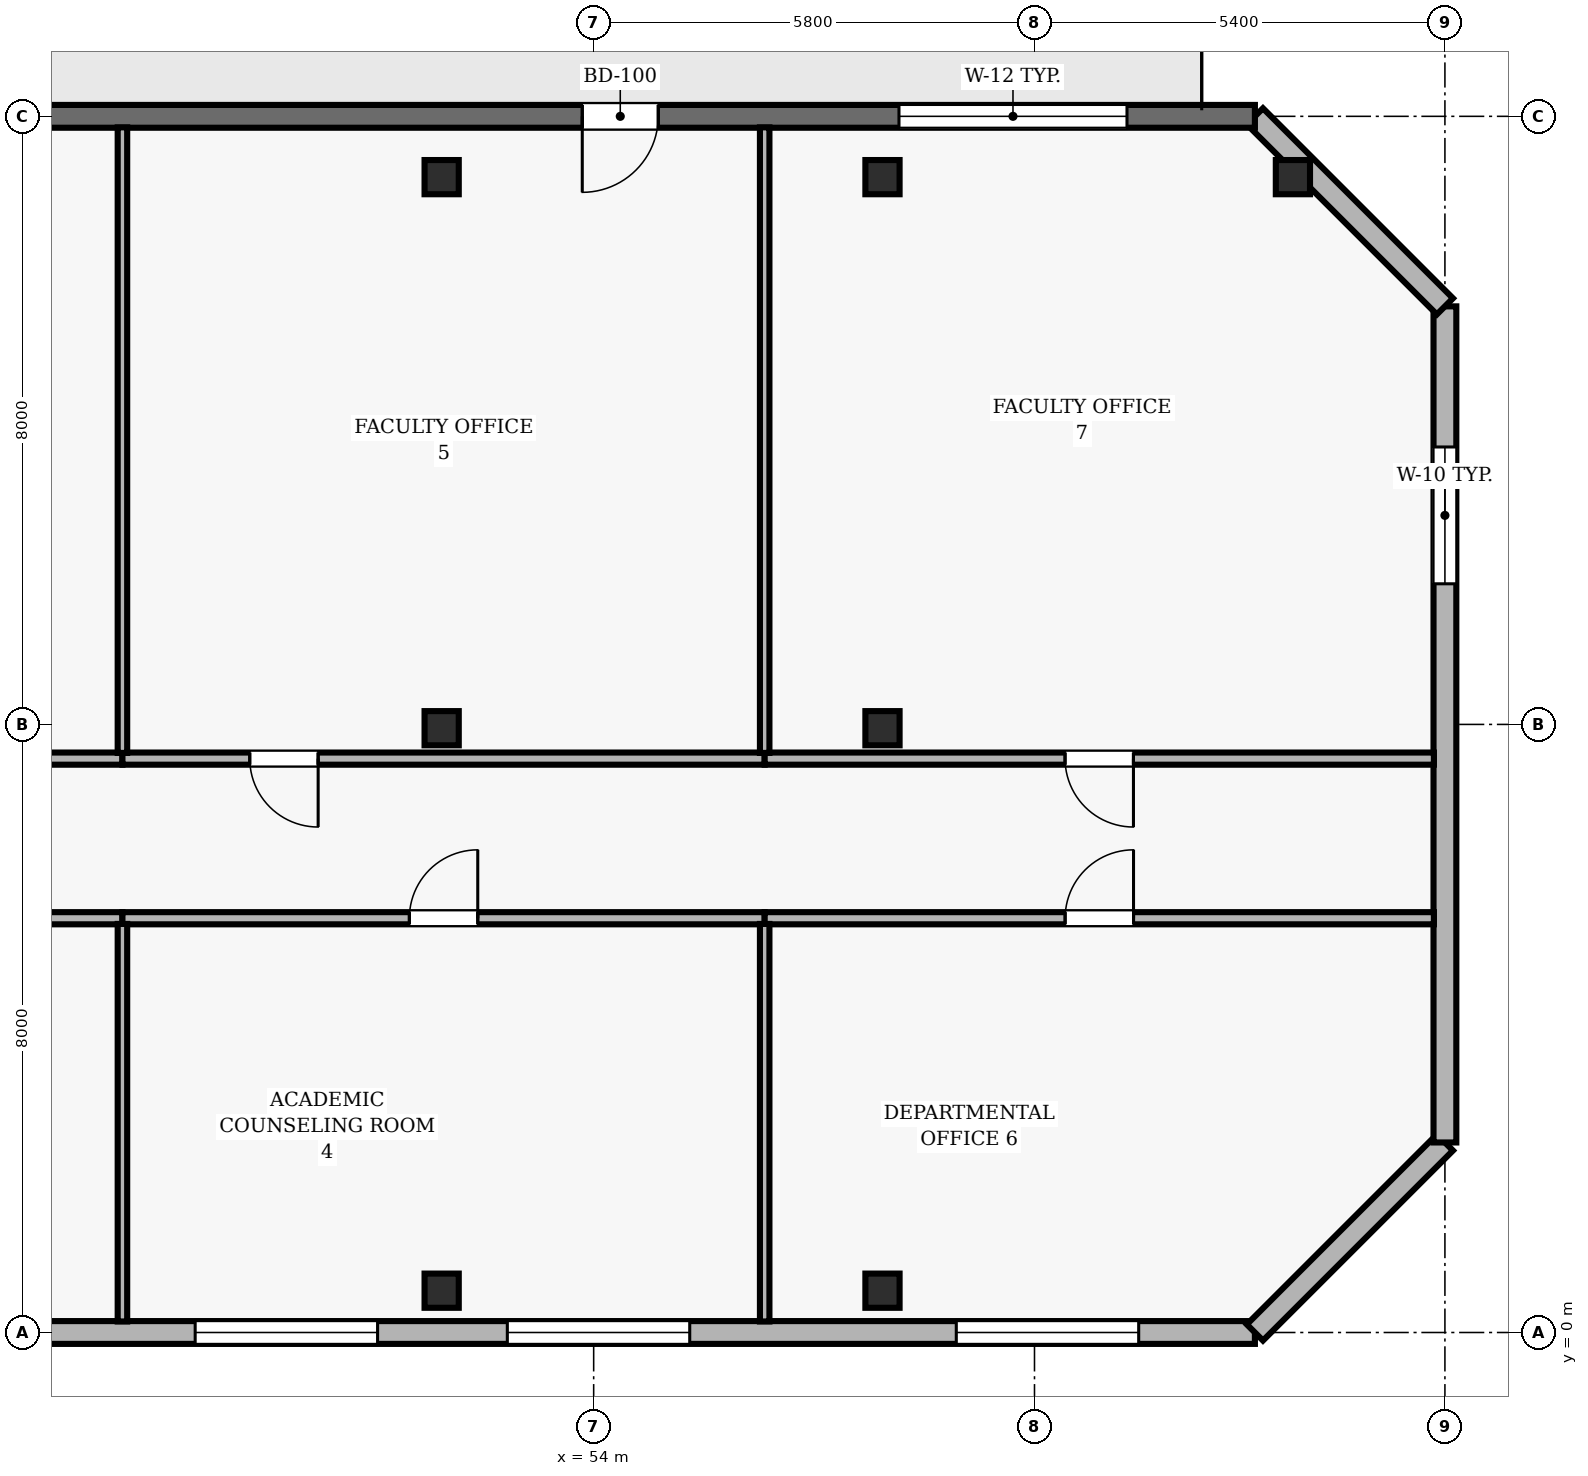
"""IFC4 building model, lengths in metres.
Left out: names, types, materials, properties, quantities, classifications, styles, units other than length and angle.
Written with IfcOpenShell. Run it as: python <this file> out.ifc"""

import sys

from ifc_helpers import new_model, si_unit, direction, frame, frame_2d, origin, origin_2d, place, context, subcontext, project, spatial, rectangle, hollow_rectangle, extrude, element, fill, save


model = new_model("IFC4")
c1 = context("Model", 3, precision=1e-05, world=origin(), true_north=direction((0.0, 1.0)))
c2 = subcontext(c1, "Body", "Model", "MODEL_VIEW")
j1 = project(units=[si_unit("LENGTHUNIT", "METRE"), si_unit("PLANEANGLEUNIT", "RADIAN")], contexts=[c1])
p1 = place(None, origin())
s1 = spatial("IfcSite", under=j1, at=p1, CompositionType="ELEMENT")
p2 = place(p1, origin())
s2 = spatial("IfcBuilding", under=s1, at=p2, CompositionType="ELEMENT")
p3 = place(p2, frame((0.0, 0.0, 226.5)))
s3 = spatial("IfcBuildingStorey", under=s2, at=p3, CompositionType="ELEMENT", Elevation=226.5)
for number, where, z_axis, x_axis in (
    (1, (52.0, 0.55, 0.0), (0.0, 0.0, 1.0), (1.0, 0.0, 0.0)),
    (2, (52.0, 7.95, 0.0), (0.0, 0.0, 1.0), (1.0, 0.0, 0.0)),
    (3, (52.0, 15.2, 0.0), (0.0, 0.0, 1.0), (1.0, 0.0, 0.0)),
    (4, (57.8, 0.55, 0.0), (0.0, 0.0, 1.0), (1.0, 0.0, 0.0)),
    (5, (57.8, 7.95, 0.0), (0.0, 0.0, 1.0), (1.0, 0.0, 0.0)),
    (6, (57.8, 15.2, 0.0), (0.0, 0.0, 1.0), (1.0, 0.0, 0.0)),
    (7, (63.2, 15.2, 0.0), (0.0, 0.0, 1.0), (1.0, 0.0, 0.0)),
):
    element("IfcColumn", number, at=place(p3, frame(where, z_axis=z_axis, x_axis=x_axis)), inside=s3, PredefinedType="COLUMN", context=c2, shape_type="SweptSolid", body=[
        extrude(hollow_rectangle(XDim=0.45, YDim=0.45, WallThickness=0.02, at=origin_2d()), origin(), (0.0, 0.0, 1.0), 3.9),
    ])
p4 = place(p3, frame((24.5, 0.0, 0.0), z_axis=(0.0, 0.0, 1.0), x_axis=(1.0, 0.0, 0.0)))
e8 = element("IfcWall", 8, at=p4, inside=s3, PredefinedType="SOLIDWALL", context=c2, shape_type="SweptSolid", body=[
    extrude(rectangle(XDim=38.2, YDim=0.3, at=frame_2d((19.1, 0.0))), origin(), (0.0, 0.0, 1.0), 3.69),
])
p5 = place(p4, frame((1.529, 0.0, 0.9)))
e9 = element("IfcOpeningElement", 9, at=p5, cuts=e8, PredefinedType="OPENING", context=c2, shape_type="SweptSolid", body=[
    extrude(rectangle(XDim=2.4, YDim=1.8, at=frame_2d((1.2, 0.9))), frame((0.0, 0.16, 0.0), z_axis=(0.0, -1.0, 0.0), x_axis=(1.0, 0.0, 0.0)), (0.0, 0.0, 1.0), 0.32),
])
p6 = place(p4, frame((17.9, 0.0, 0.9)))
e10 = element("IfcOpeningElement", 10, at=p6, cuts=e8, PredefinedType="OPENING", context=c2, shape_type="SweptSolid", body=[
    extrude(rectangle(XDim=2.4, YDim=1.8, at=frame_2d((1.2, 0.9))), frame((0.0, 0.16, 0.0), z_axis=(0.0, -1.0, 0.0), x_axis=(1.0, 0.0, 0.0)), (0.0, 0.0, 1.0), 0.32),
])
p7 = place(p4, frame((24.257, 0.0, 0.9)))
e11 = element("IfcOpeningElement", 11, at=p7, cuts=e8, PredefinedType="OPENING", context=c2, shape_type="SweptSolid", body=[
    extrude(rectangle(XDim=2.4, YDim=1.8, at=frame_2d((1.2, 0.9))), frame((0.0, 0.16, 0.0), z_axis=(0.0, -1.0, 0.0), x_axis=(1.0, 0.0, 0.0)), (0.0, 0.0, 1.0), 0.32),
])
p8 = place(p4, frame((28.364, 0.0, 0.9)))
e12 = element("IfcOpeningElement", 12, at=p8, cuts=e8, PredefinedType="OPENING", context=c2, shape_type="SweptSolid", body=[
    extrude(rectangle(XDim=2.4, YDim=1.8, at=frame_2d((1.2, 0.9))), frame((0.0, 0.16, 0.0), z_axis=(0.0, -1.0, 0.0), x_axis=(1.0, 0.0, 0.0)), (0.0, 0.0, 1.0), 0.32),
])
p9 = place(p4, frame((34.271, 0.0, 0.9)))
e13 = element("IfcOpeningElement", 13, at=p9, cuts=e8, PredefinedType="OPENING", context=c2, shape_type="SweptSolid", body=[
    extrude(rectangle(XDim=2.4, YDim=1.8, at=frame_2d((1.2, 0.9))), frame((0.0, 0.16, 0.0), z_axis=(0.0, -1.0, 0.0), x_axis=(1.0, 0.0, 0.0)), (0.0, 0.0, 1.0), 0.32),
])
p10 = place(p3, frame((62.7, 0.0, 0.0), z_axis=(0.0, 0.0, 1.0), x_axis=(0.707106781187, 0.707106781187, 0.0)))
e14 = element("IfcWall", 14, at=p10, inside=s3, PredefinedType="SOLIDWALL", context=c2, shape_type="SweptSolid", body=[
    extrude(rectangle(XDim=3.536, YDim=0.3, at=frame_2d((1.768, 0.0))), origin(), (0.0, 0.0, 1.0), 3.69),
])
p11 = place(p3, frame((65.2, 2.5, 0.0), z_axis=(0.0, 0.0, 1.0), x_axis=(0.0, 1.0, 0.0)))
e15 = element("IfcWall", 15, at=p11, inside=s3, PredefinedType="SOLIDWALL", context=c2, shape_type="SweptSolid", body=[
    extrude(rectangle(XDim=11.0, YDim=0.3, at=frame_2d((5.5, 0.0))), origin(), (0.0, 0.0, 1.0), 3.69),
])
p12 = place(p11, frame((7.35, 0.0, 0.9)))
e16 = element("IfcOpeningElement", 16, at=p12, cuts=e15, PredefinedType="OPENING", context=c2, shape_type="SweptSolid", body=[
    extrude(rectangle(XDim=1.8, YDim=2.2, at=frame_2d((0.9, 1.1))), frame((0.0, 0.16, 0.0), z_axis=(0.0, -1.0, 0.0), x_axis=(1.0, 0.0, 0.0)), (0.0, 0.0, 1.0), 0.32),
])
p13 = place(p3, frame((65.2, 13.5, 0.0), z_axis=(0.0, 0.0, 1.0), x_axis=(-0.707106781187, 0.707106781187, 0.0)))
e17 = element("IfcWall", 17, at=p13, inside=s3, PredefinedType="SOLIDWALL", context=c2, shape_type="SweptSolid", body=[
    extrude(rectangle(XDim=3.536, YDim=0.3, at=frame_2d((1.768, 0.0))), origin(), (0.0, 0.0, 1.0), 3.69),
])
p14 = place(p3, frame((62.7, 16.0, 0.0), z_axis=(0.0, 0.0, 1.0), x_axis=(-1.0, 0.0, 0.0)))
e18 = element("IfcWall", 18, at=p14, inside=s3, PredefinedType="SOLIDWALL", context=c2, shape_type="SweptSolid", body=[
    extrude(rectangle(XDim=19.1, YDim=0.3, at=frame_2d((9.55, 0.0))), origin(), (0.0, 0.0, 1.0), 3.69),
])
p15 = place(p14, frame((7.85, 0.0, 0.0)))
e19 = element("IfcOpeningElement", 19, at=p15, cuts=e18, PredefinedType="OPENING", context=c2, shape_type="SweptSolid", body=[
    extrude(rectangle(XDim=1.0, YDim=2.2, at=frame_2d((0.5, 1.1))), frame((0.0, 0.16, 0.0), z_axis=(0.0, -1.0, 0.0), x_axis=(1.0, 0.0, 0.0)), (0.0, 0.0, 1.0), 0.32),
])
p16 = place(p14, frame((1.683, 0.0, 0.9)))
e20 = element("IfcOpeningElement", 20, at=p16, cuts=e18, PredefinedType="OPENING", context=c2, shape_type="SweptSolid", body=[
    extrude(rectangle(XDim=3.0, YDim=2.2, at=frame_2d((1.5, 1.1))), frame((0.0, 0.16, 0.0), z_axis=(0.0, -1.0, 0.0), x_axis=(1.0, 0.0, 0.0)), (0.0, 0.0, 1.0), 0.32),
])
p17 = place(p3, frame((40.35, 5.45, 0.0), z_axis=(0.0, 0.0, 1.0), x_axis=(1.0, 0.0, 0.0)))
e21 = element("IfcWall", 21, at=p17, inside=s3, PredefinedType="PARTITIONING", context=c2, shape_type="SweptSolid", body=[
    extrude(rectangle(XDim=7.45, YDim=0.16, at=frame_2d((3.725, 0.0))), origin(), (0.0, 0.0, 1.0), 3.372),
])
p18 = place(p17, frame((3.275, 0.0, 0.0)))
e22 = element("IfcOpeningElement", 22, at=p18, cuts=e21, PredefinedType="OPENING", context=c2, shape_type="SweptSolid", body=[
    extrude(rectangle(XDim=0.9, YDim=2.1, at=frame_2d((0.45, 1.05))), frame((0.0, 0.09, 0.0), z_axis=(0.0, -1.0, 0.0), x_axis=(1.0, 0.0, 0.0)), (0.0, 0.0, 1.0), 0.18),
])
p19 = place(p3, frame((47.8, 5.45, 0.0), z_axis=(0.0, 0.0, 1.0), x_axis=(1.0, 0.0, 0.0)))
e23 = element("IfcWall", 23, at=p19, inside=s3, PredefinedType="PARTITIONING", context=c2, shape_type="SweptSolid", body=[
    extrude(rectangle(XDim=8.45, YDim=0.16, at=frame_2d((4.225, 0.0))), origin(), (0.0, 0.0, 1.0), 3.372),
])
p20 = place(p19, frame((3.775, 0.0, 0.0)))
e24 = element("IfcOpeningElement", 24, at=p20, cuts=e23, PredefinedType="OPENING", context=c2, shape_type="SweptSolid", body=[
    extrude(rectangle(XDim=0.9, YDim=2.1, at=frame_2d((0.45, 1.05))), frame((0.0, 0.09, 0.0), z_axis=(0.0, -1.0, 0.0), x_axis=(1.0, 0.0, 0.0)), (0.0, 0.0, 1.0), 0.18),
])
p21 = place(p3, frame((47.8, 7.55, 0.0), z_axis=(0.0, 0.0, 1.0), x_axis=(-1.0, 0.0, 0.0)))
e25 = element("IfcWall", 25, at=p21, inside=s3, PredefinedType="PARTITIONING", context=c2, shape_type="SweptSolid", body=[
    extrude(rectangle(XDim=7.45, YDim=0.16, at=frame_2d((3.725, 0.0))), origin(), (0.0, 0.0, 1.0), 3.146),
])
p22 = place(p3, frame((56.25, 5.45, 0.0), z_axis=(0.0, 0.0, 1.0), x_axis=(1.0, 0.0, 0.0)))
e26 = element("IfcWall", 26, at=p22, inside=s3, PredefinedType="PARTITIONING", context=c2, shape_type="SweptSolid", body=[
    extrude(rectangle(XDim=8.805, YDim=0.16, at=frame_2d((4.402, 0.0))), origin(), (0.0, 0.0, 1.0), 3.372),
])
p23 = place(p22, frame((3.953, 0.0, 0.0)))
e27 = element("IfcOpeningElement", 27, at=p23, cuts=e26, PredefinedType="OPENING", context=c2, shape_type="SweptSolid", body=[
    extrude(rectangle(XDim=0.9, YDim=2.1, at=frame_2d((0.45, 1.05))), frame((0.0, 0.09, 0.0), z_axis=(0.0, -1.0, 0.0), x_axis=(1.0, 0.0, 0.0)), (0.0, 0.0, 1.0), 0.18),
])
p24 = place(p3, frame((56.25, 7.55, 0.0), z_axis=(0.0, 0.0, 1.0), x_axis=(-1.0, 0.0, 0.0)))
e28 = element("IfcWall", 28, at=p24, inside=s3, PredefinedType="PARTITIONING", context=c2, shape_type="SweptSolid", body=[
    extrude(rectangle(XDim=8.45, YDim=0.16, at=frame_2d((4.225, 0.0))), origin(), (0.0, 0.0, 1.0), 3.146),
])
p25 = place(p24, frame((5.875, 0.0, 0.0)))
e29 = element("IfcOpeningElement", 29, at=p25, cuts=e28, PredefinedType="OPENING", context=c2, shape_type="SweptSolid", body=[
    extrude(rectangle(XDim=0.9, YDim=2.1, at=frame_2d((0.45, 1.05))), frame((0.0, 0.09, 0.0), z_axis=(0.0, -1.0, 0.0), x_axis=(1.0, 0.0, 0.0)), (0.0, 0.0, 1.0), 0.18),
])
p26 = place(p3, frame((65.055, 7.55, 0.0), z_axis=(0.0, 0.0, 1.0), x_axis=(-1.0, 0.0, 0.0)))
e30 = element("IfcWall", 30, at=p26, inside=s3, PredefinedType="PARTITIONING", context=c2, shape_type="SweptSolid", body=[
    extrude(rectangle(XDim=8.805, YDim=0.16, at=frame_2d((4.402, 0.0))), origin(), (0.0, 0.0, 1.0), 3.146),
])
p27 = place(p26, frame((3.953, 0.0, 0.0)))
e31 = element("IfcOpeningElement", 31, at=p27, cuts=e30, PredefinedType="OPENING", context=c2, shape_type="SweptSolid", body=[
    extrude(rectangle(XDim=0.9, YDim=2.1, at=frame_2d((0.45, 1.05))), frame((0.0, 0.09, 0.0), z_axis=(0.0, -1.0, 0.0), x_axis=(1.0, 0.0, 0.0)), (0.0, 0.0, 1.0), 0.18),
])
p28 = place(p3, frame((47.8, 0.145, 0.0), z_axis=(0.0, 0.0, 1.0), x_axis=(0.0, 1.0, 0.0)))
e32 = element("IfcWall", 32, at=p28, inside=s3, PredefinedType="PARTITIONING", context=c2, shape_type="SweptSolid", body=[
    extrude(rectangle(XDim=5.23, YDim=0.125, at=frame_2d((2.615, 0.0))), origin(), (0.0, 0.0, 1.0), 3.69),
])
p29 = place(p3, frame((47.8, 7.625, 0.0), z_axis=(0.0, 0.0, 1.0), x_axis=(0.0, 1.0, 0.0)))
e33 = element("IfcWall", 33, at=p29, inside=s3, PredefinedType="PARTITIONING", context=c2, shape_type="SweptSolid", body=[
    extrude(rectangle(XDim=8.23, YDim=0.125, at=frame_2d((4.115, 0.0))), origin(), (0.0, 0.0, 1.0), 3.69),
])
p30 = place(p3, frame((56.25, 0.145, 0.0), z_axis=(0.0, 0.0, 1.0), x_axis=(0.0, 1.0, 0.0)))
e34 = element("IfcWall", 34, at=p30, inside=s3, PredefinedType="PARTITIONING", context=c2, shape_type="SweptSolid", body=[
    extrude(rectangle(XDim=5.23, YDim=0.125, at=frame_2d((2.615, 0.0))), origin(), (0.0, 0.0, 1.0), 3.69),
])
p31 = place(p3, frame((56.25, 7.625, 0.0), z_axis=(0.0, 0.0, 1.0), x_axis=(0.0, 1.0, 0.0)))
e35 = element("IfcWall", 35, at=p31, inside=s3, PredefinedType="PARTITIONING", context=c2, shape_type="SweptSolid", body=[
    extrude(rectangle(XDim=8.23, YDim=0.125, at=frame_2d((4.115, 0.0))), origin(), (0.0, 0.0, 1.0), 3.69),
])
p32 = place(p7, origin())
e36 = element("IfcWindow", 36, at=p32, inside=s3, PartitioningType="SINGLE_PANEL", PredefinedType="WINDOW", context=c2, shape_type="SweptSolid", body=[
    extrude(rectangle(XDim=2.4, YDim=1.8, at=frame_2d((1.2, 0.9))), frame((0.0, 0.03, 0.0), z_axis=(0.0, -1.0, 0.0), x_axis=(1.0, 0.0, 0.0)), (0.0, 0.0, 1.0), 0.06),
])
fill(e11, e36)
p33 = place(p8, origin())
e37 = element("IfcWindow", 37, at=p33, inside=s3, PartitioningType="SINGLE_PANEL", PredefinedType="WINDOW", context=c2, shape_type="SweptSolid", body=[
    extrude(rectangle(XDim=2.4, YDim=1.8, at=frame_2d((1.2, 0.9))), frame((0.0, 0.03, 0.0), z_axis=(0.0, -1.0, 0.0), x_axis=(1.0, 0.0, 0.0)), (0.0, 0.0, 1.0), 0.06),
])
fill(e12, e37)
p34 = place(p9, origin())
e38 = element("IfcWindow", 38, at=p34, inside=s3, PartitioningType="SINGLE_PANEL", PredefinedType="WINDOW", context=c2, shape_type="SweptSolid", body=[
    extrude(rectangle(XDim=2.4, YDim=1.8, at=frame_2d((1.2, 0.9))), frame((0.0, 0.03, 0.0), z_axis=(0.0, -1.0, 0.0), x_axis=(1.0, 0.0, 0.0)), (0.0, 0.0, 1.0), 0.06),
])
fill(e13, e38)
p35 = place(p12, origin())
e39 = element("IfcWindow", 39, at=p35, inside=s3, PartitioningType="SINGLE_PANEL", PredefinedType="WINDOW", context=c2, shape_type="SweptSolid", body=[
    extrude(rectangle(XDim=1.8, YDim=2.2, at=frame_2d((0.9, 1.1))), frame((0.0, 0.03, 0.0), z_axis=(0.0, -1.0, 0.0), x_axis=(1.0, 0.0, 0.0)), (0.0, 0.0, 1.0), 0.06),
])
fill(e16, e39)
p36 = place(p15, origin())
e40 = element("IfcDoor", 40, at=p36, inside=s3, OperationType="SINGLE_SWING_RIGHT", PredefinedType="DOOR", context=c2, shape_type="SweptSolid", body=[
    extrude(rectangle(XDim=1.0, YDim=2.2, at=frame_2d((0.5, 1.1))), frame((0.0, 0.025, 0.0), z_axis=(0.0, -1.0, 0.0), x_axis=(1.0, 0.0, 0.0)), (0.0, 0.0, 1.0), 0.05),
])
fill(e19, e40)
p37 = place(p16, origin())
e41 = element("IfcWindow", 41, at=p37, inside=s3, PartitioningType="SINGLE_PANEL", PredefinedType="WINDOW", context=c2, shape_type="SweptSolid", body=[
    extrude(rectangle(XDim=3.0, YDim=2.2, at=frame_2d((1.5, 1.1))), frame((0.0, 0.03, 0.0), z_axis=(0.0, -1.0, 0.0), x_axis=(1.0, 0.0, 0.0)), (0.0, 0.0, 1.0), 0.06),
])
fill(e20, e41)
p38 = place(p20, origin())
e42 = element("IfcDoor", 42, at=p38, inside=s3, OperationType="SINGLE_SWING_RIGHT", PredefinedType="DOOR", context=c2, shape_type="SweptSolid", body=[
    extrude(rectangle(XDim=0.9, YDim=2.1, at=frame_2d((0.45, 1.05))), frame((0.0, 0.025, 0.0), z_axis=(0.0, -1.0, 0.0), x_axis=(1.0, 0.0, 0.0)), (0.0, 0.0, 1.0), 0.05),
])
fill(e24, e42)
p39 = place(p25, origin())
e43 = element("IfcDoor", 43, at=p39, inside=s3, OperationType="SINGLE_SWING_LEFT", PredefinedType="DOOR", context=c2, shape_type="SweptSolid", body=[
    extrude(rectangle(XDim=0.9, YDim=2.1, at=frame_2d((0.45, 1.05))), frame((0.0, 0.025, 0.0), z_axis=(0.0, -1.0, 0.0), x_axis=(1.0, 0.0, 0.0)), (0.0, 0.0, 1.0), 0.05),
])
fill(e29, e43)
p40 = place(p23, origin())
e44 = element("IfcDoor", 44, at=p40, inside=s3, OperationType="SINGLE_SWING_RIGHT", PredefinedType="DOOR", context=c2, shape_type="SweptSolid", body=[
    extrude(rectangle(XDim=0.9, YDim=2.1, at=frame_2d((0.45, 1.05))), frame((0.0, 0.025, 0.0), z_axis=(0.0, -1.0, 0.0), x_axis=(1.0, 0.0, 0.0)), (0.0, 0.0, 1.0), 0.05),
])
fill(e27, e44)
p41 = place(p27, origin())
e45 = element("IfcDoor", 45, at=p41, inside=s3, OperationType="SINGLE_SWING_LEFT", PredefinedType="DOOR", context=c2, shape_type="SweptSolid", body=[
    extrude(rectangle(XDim=0.9, YDim=2.1, at=frame_2d((0.45, 1.05))), frame((0.0, 0.025, 0.0), z_axis=(0.0, -1.0, 0.0), x_axis=(1.0, 0.0, 0.0)), (0.0, 0.0, 1.0), 0.05),
])
fill(e31, e45)
save(model, sys.argv[1])
